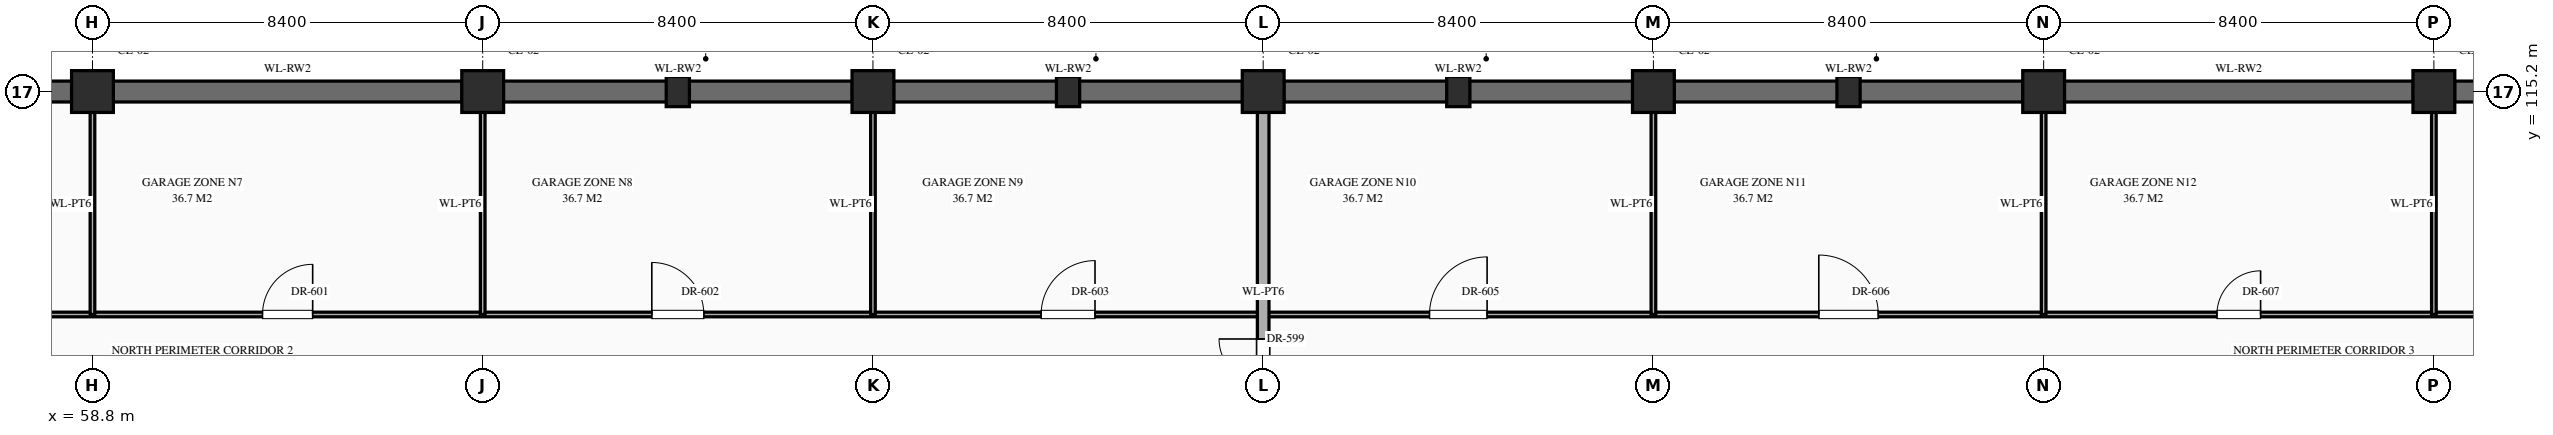
"""IFC4 building model, lengths in metres.
Left out: names, types, materials, properties, quantities, classifications, styles, units other than length and angle.
Written with IfcOpenShell. Run it as: python <this file> out.ifc"""

import sys

from ifc_helpers import new_model, si_unit, direction, frame, frame_2d, origin, origin_2d, place, context, subcontext, project, spatial, rectangle, extrude, element, fill, save


model = new_model("IFC4")
c1 = context("Model", 3, precision=1e-05, world=origin(), true_north=direction((0.0, 1.0)))
c2 = subcontext(c1, "Body", "Model", "MODEL_VIEW")
j1 = project(units=[si_unit("LENGTHUNIT", "METRE"), si_unit("PLANEANGLEUNIT", "RADIAN")], contexts=[c1])
p1 = place(None, origin())
s1 = spatial("IfcSite", under=j1, at=p1, CompositionType="ELEMENT")
p2 = place(p1, origin())
s2 = spatial("IfcBuilding", under=s1, at=p2, CompositionType="ELEMENT")
p3 = place(p2, frame((0.0, 0.0, -5.4)))
s3 = spatial("IfcBuildingStorey", under=s2, at=p3, CompositionType="ELEMENT", Elevation=-5.4)
for number, where, z_axis, x_axis in (
    (1, (58.8, 115.2, 0.0), (0.0, 0.0, 1.0), (1.0, 0.0, 0.0)),
    (2, (67.2, 115.2, 0.0), (0.0, 0.0, 1.0), (1.0, 0.0, 0.0)),
    (3, (75.6, 115.2, 0.0), (0.0, 0.0, 1.0), (1.0, 0.0, 0.0)),
    (4, (84.0, 115.2, 0.0), (0.0, 0.0, 1.0), (1.0, 0.0, 0.0)),
    (5, (92.4, 115.2, 0.0), (0.0, 0.0, 1.0), (1.0, 0.0, 0.0)),
    (6, (100.8, 115.2, 0.0), (0.0, 0.0, 1.0), (1.0, 0.0, 0.0)),
    (7, (109.2, 115.2, 0.0), (0.0, 0.0, 1.0), (1.0, 0.0, 0.0)),
):
    element("IfcColumn", number, at=place(p3, frame(where, z_axis=z_axis, x_axis=x_axis)), inside=s3, PredefinedType="COLUMN", context=c2, shape_type="SweptSolid", body=[
        extrude(rectangle(XDim=0.9, YDim=0.9, at=origin_2d()), origin(), (0.0, 0.0, 1.0), 5.4),
    ])
for number, where, z_axis, x_axis in (
    (8, (71.4, 115.2, 0.0), (0.0, 0.0, 1.0), (1.0, 0.0, 0.0)),
    (9, (79.8, 115.2, 0.0), (0.0, 0.0, 1.0), (1.0, 0.0, 0.0)),
    (10, (88.2, 115.2, 0.0), (0.0, 0.0, 1.0), (1.0, 0.0, 0.0)),
    (11, (96.6, 115.2, 0.0), (0.0, 0.0, 1.0), (1.0, 0.0, 0.0)),
):
    element("IfcColumn", number, at=place(p3, frame(where, z_axis=z_axis, x_axis=x_axis)), inside=s3, PredefinedType="PILASTER", context=c2, shape_type="SweptSolid", body=[
        extrude(rectangle(XDim=0.5, YDim=0.65, at=origin_2d()), origin(), (0.0, 0.0, 1.0), 5.4),
    ])
p4 = place(p3, frame((50.845, 115.2, 0.0), z_axis=(0.0, 0.0, 1.0), x_axis=(1.0, 0.0, 0.0)))
e12 = element("IfcWall", 12, at=p4, inside=s3, PredefinedType="USERDEFINED", context=c2, shape_type="SweptSolid", body=[
    extrude(rectangle(XDim=7.51, YDim=0.45, at=frame_2d((3.755, 0.0))), origin(), (0.0, 0.0, 1.0), 5.1),
])
p5 = place(p3, frame((59.245, 115.2, 0.0), z_axis=(0.0, 0.0, 1.0), x_axis=(1.0, 0.0, 0.0)))
e13 = element("IfcWall", 13, at=p5, inside=s3, PredefinedType="USERDEFINED", context=c2, shape_type="SweptSolid", body=[
    extrude(rectangle(XDim=7.51, YDim=0.45, at=frame_2d((3.755, 0.0))), origin(), (0.0, 0.0, 1.0), 5.1),
])
for number, where, z_axis, x_axis in (
    (14, (67.645, 115.2, 0.0), (0.0, 0.0, 1.0), (1.0, 0.0, 0.0)),
    (15, (76.045, 115.2, 0.0), (0.0, 0.0, 1.0), (1.0, 0.0, 0.0)),
    (16, (84.445, 115.2, 0.0), (0.0, 0.0, 1.0), (1.0, 0.0, 0.0)),
    (17, (92.845, 115.2, 0.0), (0.0, 0.0, 1.0), (1.0, 0.0, 0.0)),
):
    element("IfcWall", number, at=place(p3, frame(where, z_axis=z_axis, x_axis=x_axis)), inside=s3, PredefinedType="USERDEFINED", context=c2, shape_type="SweptSolid", body=[
        extrude(rectangle(XDim=7.51, YDim=0.45, at=frame_2d((3.755, 0.0))), origin(), (0.0, 0.0, 1.0), 5.1),
    ])
p6 = place(p3, frame((101.245, 115.2, 0.0), z_axis=(0.0, 0.0, 1.0), x_axis=(1.0, 0.0, 0.0)))
e18 = element("IfcWall", 18, at=p6, inside=s3, PredefinedType="USERDEFINED", context=c2, shape_type="SweptSolid", body=[
    extrude(rectangle(XDim=7.51, YDim=0.45, at=frame_2d((3.755, 0.0))), origin(), (0.0, 0.0, 1.0), 5.1),
])
p7 = place(p3, frame((109.645, 115.2, 0.0), z_axis=(0.0, 0.0, 1.0), x_axis=(1.0, 0.0, 0.0)))
e19 = element("IfcWall", 19, at=p7, inside=s3, PredefinedType="USERDEFINED", context=c2, shape_type="SweptSolid", body=[
    extrude(rectangle(XDim=7.51, YDim=0.45, at=frame_2d((3.755, 0.0))), origin(), (0.0, 0.0, 1.0), 5.1),
])
p8 = place(p3, frame((0.04, 110.4, 0.0), z_axis=(0.0, 0.0, 1.0), x_axis=(1.0, 0.0, 0.0)))
e20 = element("IfcWall", 20, at=p8, inside=s3, PredefinedType="STANDARD", context=c2, shape_type="SweptSolid", body=[
    extrude(rectangle(XDim=167.92, YDim=0.1, at=frame_2d((83.96, 0.0))), origin(), (0.0, 0.0, 1.0), 5.1),
])
p9 = place(p8, frame((3.65, 0.0, 0.0)))
e21 = element("IfcOpeningElement", 21, at=p9, cuts=e20, PredefinedType="OPENING", context=c2, shape_type="SweptSolid", body=[
    extrude(rectangle(XDim=1.06, YDim=2.4, at=frame_2d((0.53, 1.2))), frame((0.0, 0.062, 0.0), z_axis=(0.0, -1.0, 0.0), x_axis=(1.0, 0.0, 0.0)), (0.0, 0.0, 1.0), 0.124),
])
p10 = place(p8, frame((11.99, 0.0, 0.0)))
e22 = element("IfcOpeningElement", 22, at=p10, cuts=e20, PredefinedType="OPENING", context=c2, shape_type="SweptSolid", body=[
    extrude(rectangle(XDim=1.14, YDim=2.4, at=frame_2d((0.57, 1.2))), frame((0.0, 0.062, 0.0), z_axis=(0.0, -1.0, 0.0), x_axis=(1.0, 0.0, 0.0)), (0.0, 0.0, 1.0), 0.124),
])
p11 = place(p8, frame((20.51, 0.0, 0.0)))
e23 = element("IfcOpeningElement", 23, at=p11, cuts=e20, PredefinedType="OPENING", context=c2, shape_type="SweptSolid", body=[
    extrude(rectangle(XDim=0.9, YDim=2.15, at=frame_2d((0.45, 1.075))), frame((0.0, 0.062, 0.0), z_axis=(0.0, -1.0, 0.0), x_axis=(1.0, 0.0, 0.0)), (0.0, 0.0, 1.0), 0.124),
])
p12 = place(p8, frame((28.93, 0.0, 0.0)))
e24 = element("IfcOpeningElement", 24, at=p12, cuts=e20, PredefinedType="OPENING", context=c2, shape_type="SweptSolid", body=[
    extrude(rectangle(XDim=0.86, YDim=2.1, at=frame_2d((0.43, 1.05))), frame((0.0, 0.062, 0.0), z_axis=(0.0, -1.0, 0.0), x_axis=(1.0, 0.0, 0.0)), (0.0, 0.0, 1.0), 0.124),
])
p13 = place(p8, frame((37.3, 0.0, 0.0)))
e25 = element("IfcOpeningElement", 25, at=p13, cuts=e20, PredefinedType="OPENING", context=c2, shape_type="SweptSolid", body=[
    extrude(rectangle(XDim=0.92, YDim=2.15, at=frame_2d((0.46, 1.075))), frame((0.0, 0.062, 0.0), z_axis=(0.0, -1.0, 0.0), x_axis=(1.0, 0.0, 0.0)), (0.0, 0.0, 1.0), 0.124),
])
p14 = place(p8, frame((45.68, 0.0, 0.0)))
e26 = element("IfcOpeningElement", 26, at=p14, cuts=e20, PredefinedType="OPENING", context=c2, shape_type="SweptSolid", body=[
    extrude(rectangle(XDim=0.96, YDim=2.2, at=frame_2d((0.48, 1.1))), frame((0.0, 0.062, 0.0), z_axis=(0.0, -1.0, 0.0), x_axis=(1.0, 0.0, 0.0)), (0.0, 0.0, 1.0), 0.124),
])
p15 = place(p8, frame((54.04, 0.0, 0.0)))
e27 = element("IfcOpeningElement", 27, at=p15, cuts=e20, PredefinedType="OPENING", context=c2, shape_type="SweptSolid", body=[
    extrude(rectangle(XDim=1.04, YDim=2.2, at=frame_2d((0.52, 1.1))), frame((0.0, 0.062, 0.0), z_axis=(0.0, -1.0, 0.0), x_axis=(1.0, 0.0, 0.0)), (0.0, 0.0, 1.0), 0.124),
])
p16 = place(p8, frame((62.42, 0.0, 0.0)))
e28 = element("IfcOpeningElement", 28, at=p16, cuts=e20, PredefinedType="OPENING", context=c2, shape_type="SweptSolid", body=[
    extrude(rectangle(XDim=1.08, YDim=2.25, at=frame_2d((0.54, 1.125))), frame((0.0, 0.062, 0.0), z_axis=(0.0, -1.0, 0.0), x_axis=(1.0, 0.0, 0.0)), (0.0, 0.0, 1.0), 0.124),
])
p17 = place(p8, frame((70.8, 0.0, 0.0)))
e29 = element("IfcOpeningElement", 29, at=p17, cuts=e20, PredefinedType="OPENING", context=c2, shape_type="SweptSolid", body=[
    extrude(rectangle(XDim=1.12, YDim=2.25, at=frame_2d((0.56, 1.125))), frame((0.0, 0.062, 0.0), z_axis=(0.0, -1.0, 0.0), x_axis=(1.0, 0.0, 0.0)), (0.0, 0.0, 1.0), 0.124),
])
p18 = place(p8, frame((79.18, 0.0, 0.0)))
e30 = element("IfcOpeningElement", 30, at=p18, cuts=e20, PredefinedType="OPENING", context=c2, shape_type="SweptSolid", body=[
    extrude(rectangle(XDim=1.16, YDim=2.3, at=frame_2d((0.58, 1.15))), frame((0.0, 0.062, 0.0), z_axis=(0.0, -1.0, 0.0), x_axis=(1.0, 0.0, 0.0)), (0.0, 0.0, 1.0), 0.124),
])
p19 = place(p8, frame((87.54, 0.0, 0.0)))
e31 = element("IfcOpeningElement", 31, at=p19, cuts=e20, PredefinedType="OPENING", context=c2, shape_type="SweptSolid", body=[
    extrude(rectangle(XDim=1.24, YDim=2.3, at=frame_2d((0.62, 1.15))), frame((0.0, 0.062, 0.0), z_axis=(0.0, -1.0, 0.0), x_axis=(1.0, 0.0, 0.0)), (0.0, 0.0, 1.0), 0.124),
])
p20 = place(p8, frame((95.92, 0.0, 0.0)))
e32 = element("IfcOpeningElement", 32, at=p20, cuts=e20, PredefinedType="OPENING", context=c2, shape_type="SweptSolid", body=[
    extrude(rectangle(XDim=1.28, YDim=2.35, at=frame_2d((0.64, 1.175))), frame((0.0, 0.062, 0.0), z_axis=(0.0, -1.0, 0.0), x_axis=(1.0, 0.0, 0.0)), (0.0, 0.0, 1.0), 0.124),
])
p21 = place(p8, frame((104.49, 0.0, 0.0)))
e33 = element("IfcOpeningElement", 33, at=p21, cuts=e20, PredefinedType="OPENING", context=c2, shape_type="SweptSolid", body=[
    extrude(rectangle(XDim=0.94, YDim=2.3, at=frame_2d((0.47, 1.15))), frame((0.0, 0.062, 0.0), z_axis=(0.0, -1.0, 0.0), x_axis=(1.0, 0.0, 0.0)), (0.0, 0.0, 1.0), 0.124),
])
p22 = place(p8, frame((112.87, 0.0, 0.0)))
e34 = element("IfcOpeningElement", 34, at=p22, cuts=e20, PredefinedType="OPENING", context=c2, shape_type="SweptSolid", body=[
    extrude(rectangle(XDim=0.98, YDim=2.35, at=frame_2d((0.49, 1.175))), frame((0.0, 0.062, 0.0), z_axis=(0.0, -1.0, 0.0), x_axis=(1.0, 0.0, 0.0)), (0.0, 0.0, 1.0), 0.124),
])
p23 = place(p8, frame((121.25, 0.0, 0.0)))
e35 = element("IfcOpeningElement", 35, at=p23, cuts=e20, PredefinedType="OPENING", context=c2, shape_type="SweptSolid", body=[
    extrude(rectangle(XDim=1.02, YDim=2.4, at=frame_2d((0.51, 1.2))), frame((0.0, 0.062, 0.0), z_axis=(0.0, -1.0, 0.0), x_axis=(1.0, 0.0, 0.0)), (0.0, 0.0, 1.0), 0.124),
])
p24 = place(p8, frame((129.63, 0.0, 0.0)))
e36 = element("IfcOpeningElement", 36, at=p24, cuts=e20, PredefinedType="OPENING", context=c2, shape_type="SweptSolid", body=[
    extrude(rectangle(XDim=1.06, YDim=2.4, at=frame_2d((0.53, 1.2))), frame((0.0, 0.062, 0.0), z_axis=(0.0, -1.0, 0.0), x_axis=(1.0, 0.0, 0.0)), (0.0, 0.0, 1.0), 0.124),
])
p25 = place(p8, frame((137.99, 0.0, 0.0)))
e37 = element("IfcOpeningElement", 37, at=p25, cuts=e20, PredefinedType="OPENING", context=c2, shape_type="SweptSolid", body=[
    extrude(rectangle(XDim=1.14, YDim=2.4, at=frame_2d((0.57, 1.2))), frame((0.0, 0.062, 0.0), z_axis=(0.0, -1.0, 0.0), x_axis=(1.0, 0.0, 0.0)), (0.0, 0.0, 1.0), 0.124),
])
p26 = place(p8, frame((146.51, 0.0, 0.0)))
e38 = element("IfcOpeningElement", 38, at=p26, cuts=e20, PredefinedType="OPENING", context=c2, shape_type="SweptSolid", body=[
    extrude(rectangle(XDim=0.9, YDim=2.15, at=frame_2d((0.45, 1.075))), frame((0.0, 0.062, 0.0), z_axis=(0.0, -1.0, 0.0), x_axis=(1.0, 0.0, 0.0)), (0.0, 0.0, 1.0), 0.124),
])
p27 = place(p8, frame((154.93, 0.0, 0.0)))
e39 = element("IfcOpeningElement", 39, at=p27, cuts=e20, PredefinedType="OPENING", context=c2, shape_type="SweptSolid", body=[
    extrude(rectangle(XDim=0.86, YDim=2.1, at=frame_2d((0.43, 1.05))), frame((0.0, 0.062, 0.0), z_axis=(0.0, -1.0, 0.0), x_axis=(1.0, 0.0, 0.0)), (0.0, 0.0, 1.0), 0.124),
])
p28 = place(p8, frame((163.28, 0.0, 0.0)))
e40 = element("IfcOpeningElement", 40, at=p28, cuts=e20, PredefinedType="OPENING", context=c2, shape_type="SweptSolid", body=[
    extrude(rectangle(XDim=0.92, YDim=2.15, at=frame_2d((0.46, 1.075))), frame((0.0, 0.062, 0.0), z_axis=(0.0, -1.0, 0.0), x_axis=(1.0, 0.0, 0.0)), (0.0, 0.0, 1.0), 0.124),
])
for number, where, z_axis, x_axis in (
    (41, (58.8, 110.4, 0.0), (0.0, 0.0, 1.0), (0.0, 1.0, 0.0)),
    (42, (67.2, 110.4, 0.0), (0.0, 0.0, 1.0), (0.0, 1.0, 0.0)),
    (43, (75.6, 110.4, 0.0), (0.0, 0.0, 1.0), (0.0, 1.0, 0.0)),
):
    element("IfcWall", number, at=place(p3, frame(where, z_axis=z_axis, x_axis=x_axis)), inside=s3, PredefinedType="STANDARD", context=c2, shape_type="SweptSolid", body=[
        extrude(rectangle(XDim=4.76, YDim=0.1, at=frame_2d((2.38, 0.0))), origin(), (0.0, 0.0, 1.0), 4.35),
    ])
p29 = place(p3, frame((84.0, 79.2, 0.0), z_axis=(0.0, 0.0, 1.0), x_axis=(0.0, 1.0, 0.0)))
e44 = element("IfcWall", 44, at=p29, inside=s3, PredefinedType="STANDARD", context=c2, shape_type="SweptSolid", body=[
    extrude(rectangle(XDim=35.96, YDim=0.25, at=frame_2d((17.98, 0.0))), origin(), (0.0, 0.0, 1.0), 4.35),
])
p30 = place(p29, frame((22.798, 0.0, 0.0)))
e45 = element("IfcOpeningElement", 45, at=p30, cuts=e44, PredefinedType="OPENING", context=c2, shape_type="SweptSolid", body=[
    extrude(rectangle(XDim=1.6, YDim=2.3, at=frame_2d((0.8, 1.15))), frame((0.0, 0.137, 0.0), z_axis=(0.0, -1.0, 0.0), x_axis=(1.0, 0.0, 0.0)), (0.0, 0.0, 1.0), 0.274),
])
p31 = place(p29, frame((12.528, 0.0, 0.0)))
e46 = element("IfcOpeningElement", 46, at=p31, cuts=e44, PredefinedType="OPENING", context=c2, shape_type="SweptSolid", body=[
    extrude(rectangle(XDim=0.95, YDim=2.15, at=frame_2d((0.475, 1.075))), frame((0.0, 0.137, 0.0), z_axis=(0.0, -1.0, 0.0), x_axis=(1.0, 0.0, 0.0)), (0.0, 0.0, 1.0), 0.274),
])
p32 = place(p29, frame((15.323, 0.0, 0.0)))
e47 = element("IfcOpeningElement", 47, at=p32, cuts=e44, PredefinedType="OPENING", context=c2, shape_type="SweptSolid", body=[
    extrude(rectangle(XDim=0.95, YDim=2.15, at=frame_2d((0.475, 1.075))), frame((0.0, 0.137, 0.0), z_axis=(0.0, -1.0, 0.0), x_axis=(1.0, 0.0, 0.0)), (0.0, 0.0, 1.0), 0.274),
])
p33 = place(p29, frame((25.903, 0.0, 0.0)))
e48 = element("IfcOpeningElement", 48, at=p33, cuts=e44, PredefinedType="OPENING", context=c2, shape_type="SweptSolid", body=[
    extrude(rectangle(XDim=1.8, YDim=2.35, at=frame_2d((0.9, 1.175))), frame((0.0, 0.137, 0.0), z_axis=(0.0, -1.0, 0.0), x_axis=(1.0, 0.0, 0.0)), (0.0, 0.0, 1.0), 0.274),
])
p34 = place(p29, frame((29.722, 0.0, 0.0)))
e49 = element("IfcOpeningElement", 49, at=p34, cuts=e44, PredefinedType="OPENING", context=c2, shape_type="SweptSolid", body=[
    extrude(rectangle(XDim=0.95, YDim=2.15, at=frame_2d((0.475, 1.075))), frame((0.0, 0.137, 0.0), z_axis=(0.0, -1.0, 0.0), x_axis=(1.0, 0.0, 0.0)), (0.0, 0.0, 1.0), 0.274),
])
p35 = place(p29, frame((5.327, 0.0, 0.0)))
e50 = element("IfcOpeningElement", 50, at=p35, cuts=e44, PredefinedType="OPENING", context=c2, shape_type="SweptSolid", body=[
    extrude(rectangle(XDim=0.95, YDim=2.15, at=frame_2d((0.475, 1.075))), frame((0.0, 0.137, 0.0), z_axis=(0.0, -1.0, 0.0), x_axis=(1.0, 0.0, 0.0)), (0.0, 0.0, 1.0), 0.274),
])
for number, where, z_axis, x_axis in (
    (51, (92.4, 110.4, 0.0), (0.0, 0.0, 1.0), (0.0, 1.0, 0.0)),
    (52, (100.8, 110.4, 0.0), (0.0, 0.0, 1.0), (0.0, 1.0, 0.0)),
    (53, (109.2, 110.4, 0.0), (0.0, 0.0, 1.0), (0.0, 1.0, 0.0)),
):
    element("IfcWall", number, at=place(p3, frame(where, z_axis=z_axis, x_axis=x_axis)), inside=s3, PredefinedType="STANDARD", context=c2, shape_type="SweptSolid", body=[
        extrude(rectangle(XDim=4.76, YDim=0.1, at=frame_2d((2.38, 0.0))), origin(), (0.0, 0.0, 1.0), 4.35),
    ])
p36 = place(p34, origin())
e54 = element("IfcDoor", 54, at=p36, inside=s3, OperationType="SINGLE_SWING_RIGHT", PredefinedType="DOOR", context=c2, shape_type="SweptSolid", body=[
    extrude(rectangle(XDim=0.95, YDim=2.15, at=frame_2d((0.475, 1.075))), frame((0.0, 0.025, 0.0), z_axis=(0.0, -1.0, 0.0), x_axis=(1.0, 0.0, 0.0)), (0.0, 0.0, 1.0), 0.05),
])
fill(e49, e54)
p37 = place(p16, origin())
e55 = element("IfcDoor", 55, at=p37, inside=s3, OperationType="SINGLE_SWING_RIGHT", PredefinedType="DOOR", context=c2, shape_type="SweptSolid", body=[
    extrude(rectangle(XDim=1.08, YDim=2.25, at=frame_2d((0.54, 1.125))), frame((0.0, 0.025, 0.0), z_axis=(0.0, -1.0, 0.0), x_axis=(1.0, 0.0, 0.0)), (0.0, 0.0, 1.0), 0.05),
])
fill(e28, e55)
p38 = place(p17, origin())
e56 = element("IfcDoor", 56, at=p38, inside=s3, OperationType="SINGLE_SWING_LEFT", PredefinedType="DOOR", context=c2, shape_type="SweptSolid", body=[
    extrude(rectangle(XDim=1.12, YDim=2.25, at=frame_2d((0.56, 1.125))), frame((0.0, 0.025, 0.0), z_axis=(0.0, -1.0, 0.0), x_axis=(1.0, 0.0, 0.0)), (0.0, 0.0, 1.0), 0.05),
])
fill(e29, e56)
p39 = place(p18, origin())
e57 = element("IfcDoor", 57, at=p39, inside=s3, OperationType="SINGLE_SWING_RIGHT", PredefinedType="DOOR", context=c2, shape_type="SweptSolid", body=[
    extrude(rectangle(XDim=1.16, YDim=2.3, at=frame_2d((0.58, 1.15))), frame((0.0, 0.025, 0.0), z_axis=(0.0, -1.0, 0.0), x_axis=(1.0, 0.0, 0.0)), (0.0, 0.0, 1.0), 0.05),
])
fill(e30, e57)
p40 = place(p19, origin())
e58 = element("IfcDoor", 58, at=p40, inside=s3, OperationType="SINGLE_SWING_RIGHT", PredefinedType="DOOR", context=c2, shape_type="SweptSolid", body=[
    extrude(rectangle(XDim=1.24, YDim=2.3, at=frame_2d((0.62, 1.15))), frame((0.0, 0.025, 0.0), z_axis=(0.0, -1.0, 0.0), x_axis=(1.0, 0.0, 0.0)), (0.0, 0.0, 1.0), 0.05),
])
fill(e31, e58)
p41 = place(p20, origin())
e59 = element("IfcDoor", 59, at=p41, inside=s3, OperationType="SINGLE_SWING_LEFT", PredefinedType="DOOR", context=c2, shape_type="SweptSolid", body=[
    extrude(rectangle(XDim=1.28, YDim=2.35, at=frame_2d((0.64, 1.175))), frame((0.0, 0.025, 0.0), z_axis=(0.0, -1.0, 0.0), x_axis=(1.0, 0.0, 0.0)), (0.0, 0.0, 1.0), 0.05),
])
fill(e32, e59)
p42 = place(p21, origin())
e60 = element("IfcDoor", 60, at=p42, inside=s3, OperationType="SINGLE_SWING_RIGHT", PredefinedType="DOOR", context=c2, shape_type="SweptSolid", body=[
    extrude(rectangle(XDim=0.94, YDim=2.3, at=frame_2d((0.47, 1.15))), frame((0.0, 0.025, 0.0), z_axis=(0.0, -1.0, 0.0), x_axis=(1.0, 0.0, 0.0)), (0.0, 0.0, 1.0), 0.05),
])
fill(e33, e60)
save(model, sys.argv[1])
